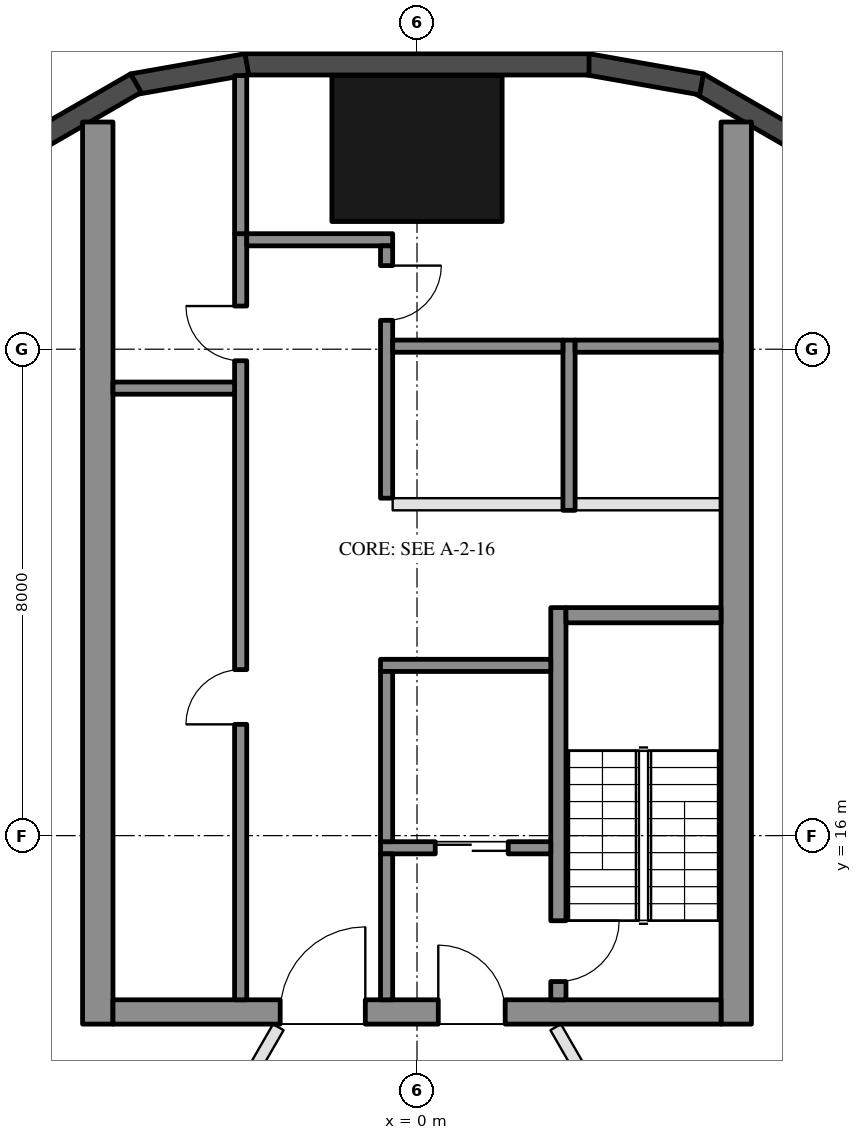
"""IFC4 building model, lengths in metres.
Left out: names, types, materials, properties, quantities, classifications, styles, units other than length and angle.
Written with IfcOpenShell. Run it as: python <this file> out.ifc"""

import sys

from ifc_helpers import new_model, si_unit, direction, frame, frame_2d, origin, origin_2d, place, context, subcontext, project, spatial, rectangle, hollow_rectangle, extrude, element, fill, save


model = new_model("IFC4")
c1 = context("Model", 3, precision=1e-05, world=origin(), true_north=direction((0.0, 1.0)))
c2 = subcontext(c1, "Body", "Model", "MODEL_VIEW")
j1 = project(units=[si_unit("LENGTHUNIT", "METRE"), si_unit("PLANEANGLEUNIT", "RADIAN")], contexts=[c1])
p1 = place(None, origin())
s1 = spatial("IfcSite", under=j1, at=p1, CompositionType="ELEMENT")
p2 = place(p1, origin())
s2 = spatial("IfcBuilding", under=s1, at=p2, CompositionType="ELEMENT")
p3 = place(p2, frame((0.0, 0.0, 79.8)))
s3 = spatial("IfcBuildingStorey", under=s2, at=p3, CompositionType="ELEMENT", Elevation=79.8)
p4 = place(p3, frame((0.0, 27.3, 0.0), z_axis=(0.0, 0.0, 1.0), x_axis=(1.0, 0.0, 0.0)))
e1 = element("IfcColumn", 1, at=p4, inside=s3, PredefinedType="COLUMN", context=c2, shape_type="SweptSolid", body=[
    extrude(hollow_rectangle(XDim=2.8, YDim=2.4, WallThickness=0.07, at=origin_2d()), origin(), (0.0, 0.0, 1.0), 3.7),
])
for number, where, z_axis, x_axis in (
    (2, (6.277, 27.422, 0.0), (0.0, 0.0, 1.0), (-0.866, 0.5, 0.0)),
    (3, (4.68, 28.356, 0.0), (0.0, 0.0, 1.0), (-0.985, 0.174, 0.0)),
):
    element("IfcWall", number, at=place(p3, frame(where, z_axis=z_axis, x_axis=x_axis)), inside=s3, PredefinedType="SOLIDWALL", context=c2, shape_type="SweptSolid", body=[
        extrude(rectangle(XDim=1.91, YDim=0.35, at=frame_2d((0.955, 0.0))), origin(), (0.0, 0.0, 1.0), 3.55),
    ])
p5 = place(p3, frame((2.829, 28.685, 0.0), z_axis=(0.0, 0.0, 1.0), x_axis=(-1.0, 0.0, 0.0)))
e4 = element("IfcWall", 4, at=p5, inside=s3, PredefinedType="SOLIDWALL", context=c2, shape_type="SweptSolid", body=[
    extrude(rectangle(XDim=5.658, YDim=0.35, at=frame_2d((2.829, 0.0))), origin(), (0.0, 0.0, 1.0), 3.55),
])
for number, where, z_axis, x_axis in (
    (5, (-2.799, 28.688, 0.0), (0.0, 0.0, 1.0), (-0.985, -0.174, 0.0)),
    (6, (-4.623, 28.377, 0.0), (0.0, 0.0, 1.0), (-0.866, -0.5, 0.0)),
):
    element("IfcWall", number, at=place(p3, frame(where, z_axis=z_axis, x_axis=x_axis)), inside=s3, PredefinedType="SOLIDWALL", context=c2, shape_type="SweptSolid", body=[
        extrude(rectangle(XDim=1.91, YDim=0.35, at=frame_2d((0.955, 0.0))), origin(), (0.0, 0.0, 1.0), 3.55),
    ])
for number, where, z_axis, x_axis in (
    (7, (5.25, 12.9, 0.0), (0.0, 0.0, 1.0), (0.0, 1.0, 0.0)),
    (8, (-5.25, 12.9, 0.0), (0.0, 0.0, 1.0), (0.0, 1.0, 0.0)),
):
    element("IfcWall", number, at=place(p3, frame(where, z_axis=z_axis, x_axis=x_axis)), inside=s3, PredefinedType="SHEAR", context=c2, shape_type="SweptSolid", body=[
        extrude(rectangle(XDim=14.837, YDim=0.5, at=frame_2d((7.418, 0.0))), origin(), (0.0, 0.0, 1.0), 3.5),
    ])
p6 = place(p3, frame((5.0, 13.1, 0.0), z_axis=(0.0, 0.0, 1.0), x_axis=(-1.0, 0.0, 0.0)))
e9 = element("IfcWall", 9, at=p6, inside=s3, PredefinedType="SHEAR", context=c2, shape_type="SweptSolid", body=[
    extrude(rectangle(XDim=10.0, YDim=0.4, at=frame_2d((5.0, 0.0))), origin(), (0.0, 0.0, 1.0), 3.5),
])
p7 = place(p6, frame((3.55, 0.0, 0.0)))
e10 = element("IfcOpeningElement", 10, at=p7, cuts=e9, PredefinedType="OPENING", context=c2, shape_type="SweptSolid", body=[
    extrude(rectangle(XDim=1.1, YDim=2.1, at=frame_2d((0.55, 1.05))), frame((0.0, 0.21, 0.0), z_axis=(0.0, -1.0, 0.0), x_axis=(1.0, 0.0, 0.0)), (0.0, 0.0, 1.0), 0.42),
])
p8 = place(p6, frame((5.85, 0.0, 0.0)))
e11 = element("IfcOpeningElement", 11, at=p8, cuts=e9, PredefinedType="OPENING", context=c2, shape_type="SweptSolid", body=[
    extrude(rectangle(XDim=1.4, YDim=2.1, at=frame_2d((0.7, 1.05))), frame((0.0, 0.21, 0.0), z_axis=(0.0, -1.0, 0.0), x_axis=(1.0, 0.0, 0.0)), (0.0, 0.0, 1.0), 0.42),
])
p9 = place(p3, frame((2.325, 13.3, 0.0), z_axis=(0.0, 0.0, 1.0), x_axis=(0.0, 1.0, 0.0)))
e12 = element("IfcWall", 12, at=p9, inside=s3, PredefinedType="SHEAR", context=c2, shape_type="SweptSolid", body=[
    extrude(rectangle(XDim=6.45, YDim=0.25, at=frame_2d((3.225, 0.0))), origin(), (0.0, 0.0, 1.0), 3.5),
])
p10 = place(p9, frame((0.3, 0.0, 0.0)))
e13 = element("IfcOpeningElement", 13, at=p10, cuts=e12, PredefinedType="OPENING", context=c2, shape_type="SweptSolid", body=[
    extrude(rectangle(XDim=1.0, YDim=2.1, at=frame_2d((0.5, 1.05))), frame((0.0, 0.135, 0.0), z_axis=(0.0, -1.0, 0.0), x_axis=(1.0, 0.0, 0.0)), (0.0, 0.0, 1.0), 0.27),
])
p11 = place(p3, frame((5.0, 19.625, 0.0), z_axis=(0.0, 0.0, 1.0), x_axis=(-1.0, 0.0, 0.0)))
e14 = element("IfcWall", 14, at=p11, inside=s3, PredefinedType="SHEAR", context=c2, shape_type="SweptSolid", body=[
    extrude(rectangle(XDim=2.55, YDim=0.25, at=frame_2d((1.275, 0.0))), origin(), (0.0, 0.0, 1.0), 3.5),
])
p12 = place(p3, frame((2.2, 18.8, 0.0), z_axis=(0.0, 0.0, 1.0), x_axis=(-1.0, 0.0, 0.0)))
e15 = element("IfcWall", 15, at=p12, inside=s3, PredefinedType="SHEAR", context=c2, shape_type="SweptSolid", body=[
    extrude(rectangle(XDim=2.8, YDim=0.2, at=frame_2d((1.4, 0.0))), origin(), (0.0, 0.0, 1.0), 3.5),
])
p13 = place(p3, frame((2.2, 15.8, 0.0), z_axis=(0.0, 0.0, 1.0), x_axis=(-1.0, 0.0, 0.0)))
e16 = element("IfcWall", 16, at=p13, inside=s3, PredefinedType="SHEAR", context=c2, shape_type="SweptSolid", body=[
    extrude(rectangle(XDim=2.8, YDim=0.2, at=frame_2d((1.4, 0.0))), origin(), (0.0, 0.0, 1.0), 3.5),
])
p14 = place(p13, frame((0.7, 0.0, 0.0)))
e17 = element("IfcOpeningElement", 17, at=p14, cuts=e16, PredefinedType="OPENING", context=c2, shape_type="SweptSolid", body=[
    extrude(rectangle(XDim=1.2, YDim=2.1, at=frame_2d((0.6, 1.05))), frame((0.0, 0.11, 0.0), z_axis=(0.0, -1.0, 0.0), x_axis=(1.0, 0.0, 0.0)), (0.0, 0.0, 1.0), 0.22),
])
p15 = place(p3, frame((-0.5, 15.9, 0.0), z_axis=(0.0, 0.0, 1.0), x_axis=(0.0, 1.0, 0.0)))
e18 = element("IfcWall", 18, at=p15, inside=s3, PredefinedType="SHEAR", context=c2, shape_type="SweptSolid", body=[
    extrude(rectangle(XDim=2.8, YDim=0.2, at=frame_2d((1.4, 0.0))), origin(), (0.0, 0.0, 1.0), 3.5),
])
p16 = place(p3, frame((-0.5, 13.3, 0.0), z_axis=(0.0, 0.0, 1.0), x_axis=(0.0, 1.0, 0.0)))
e19 = element("IfcWall", 19, at=p16, inside=s3, PredefinedType="SHEAR", context=c2, shape_type="SweptSolid", body=[
    extrude(rectangle(XDim=2.4, YDim=0.2, at=frame_2d((1.2, 0.0))), origin(), (0.0, 0.0, 1.0), 3.5),
])
p17 = place(p3, frame((-2.9, 13.3, 0.0), z_axis=(0.0, 0.0, 1.0), x_axis=(0.0, 1.0, 0.0)))
e20 = element("IfcWall", 20, at=p17, inside=s3, PredefinedType="SHEAR", context=c2, shape_type="SweptSolid", body=[
    extrude(rectangle(XDim=12.6, YDim=0.2, at=frame_2d((6.3, 0.0))), origin(), (0.0, 0.0, 1.0), 3.5),
])
p18 = place(p17, frame((4.53, 0.0, 0.0)))
e21 = element("IfcOpeningElement", 21, at=p18, cuts=e20, PredefinedType="OPENING", context=c2, shape_type="SweptSolid", body=[
    extrude(rectangle(XDim=0.9, YDim=2.1, at=frame_2d((0.45, 1.05))), frame((0.0, 0.11, 0.0), z_axis=(0.0, -1.0, 0.0), x_axis=(1.0, 0.0, 0.0)), (0.0, 0.0, 1.0), 0.22),
])
p19 = place(p17, frame((10.51, 0.0, 0.0)))
e22 = element("IfcOpeningElement", 22, at=p19, cuts=e20, PredefinedType="OPENING", context=c2, shape_type="SweptSolid", body=[
    extrude(rectangle(XDim=0.9, YDim=2.1, at=frame_2d((0.45, 1.05))), frame((0.0, 0.11, 0.0), z_axis=(0.0, -1.0, 0.0), x_axis=(1.0, 0.0, 0.0)), (0.0, 0.0, 1.0), 0.22),
])
p20 = place(p3, frame((-0.4, 25.8, 0.0), z_axis=(0.0, 0.0, 1.0), x_axis=(-1.0, 0.0, 0.0)))
e23 = element("IfcWall", 23, at=p20, inside=s3, PredefinedType="SHEAR", context=c2, shape_type="SweptSolid", body=[
    extrude(rectangle(XDim=2.4, YDim=0.2, at=frame_2d((1.2, 0.0))), origin(), (0.0, 0.0, 1.0), 3.5),
])
p21 = place(p3, frame((-0.5, 21.55, 0.0), z_axis=(0.0, 0.0, 1.0), x_axis=(0.0, 1.0, 0.0)))
e24 = element("IfcWall", 24, at=p21, inside=s3, PredefinedType="SHEAR", context=c2, shape_type="SweptSolid", body=[
    extrude(rectangle(XDim=4.15, YDim=0.2, at=frame_2d((2.075, 0.0))), origin(), (0.0, 0.0, 1.0), 3.5),
])
p22 = place(p21, frame((2.925, 0.0, 0.0)))
e25 = element("IfcOpeningElement", 25, at=p22, cuts=e24, PredefinedType="OPENING", context=c2, shape_type="SweptSolid", body=[
    extrude(rectangle(XDim=0.9, YDim=2.1, at=frame_2d((0.45, 1.05))), frame((0.0, 0.11, 0.0), z_axis=(0.0, -1.0, 0.0), x_axis=(1.0, 0.0, 0.0)), (0.0, 0.0, 1.0), 0.22),
])
p23 = place(p3, frame((-3.0, 23.36, 0.0), z_axis=(0.0, 0.0, 1.0), x_axis=(-1.0, 0.0, 0.0)))
e26 = element("IfcWall", 26, at=p23, inside=s3, PredefinedType="SHEAR", context=c2, shape_type="SweptSolid", body=[
    extrude(rectangle(XDim=2.0, YDim=0.2, at=frame_2d((1.0, 0.0))), origin(), (0.0, 0.0, 1.0), 3.5),
])
p24 = place(p3, frame((-2.9, 25.9, 0.0), z_axis=(0.0, 0.0, 1.0), x_axis=(0.0, 1.0, 0.0)))
e27 = element("IfcWall", 27, at=p24, inside=s3, PredefinedType="SHEAR", context=c2, shape_type="SweptSolid", body=[
    extrude(rectangle(XDim=2.6, YDim=0.2, at=frame_2d((1.3, 0.0))), origin(), (0.0, 0.0, 1.0), 3.5),
])
p25 = place(p3, frame((2.5, 21.35, 0.0), z_axis=(0.0, 0.0, 1.0), x_axis=(0.0, 1.0, 0.0)))
e28 = element("IfcWall", 28, at=p25, inside=s3, PredefinedType="SHEAR", context=c2, shape_type="SweptSolid", body=[
    extrude(rectangle(XDim=2.8, YDim=0.2, at=frame_2d((1.4, 0.0))), origin(), (0.0, 0.0, 1.0), 3.5),
])
p26 = place(p3, frame((5.0, 24.05, 0.0), z_axis=(0.0, 0.0, 1.0), x_axis=(-1.0, 0.0, 0.0)))
e29 = element("IfcWall", 29, at=p26, inside=s3, PredefinedType="SHEAR", context=c2, shape_type="SweptSolid", body=[
    extrude(rectangle(XDim=2.4, YDim=0.2, at=frame_2d((1.2, 0.0))), origin(), (0.0, 0.0, 1.0), 3.5),
])
p27 = place(p3, frame((2.4, 24.05, 0.0), z_axis=(0.0, 0.0, 1.0), x_axis=(-1.0, 0.0, 0.0)))
e30 = element("IfcWall", 30, at=p27, inside=s3, PredefinedType="SHEAR", context=c2, shape_type="SweptSolid", body=[
    extrude(rectangle(XDim=2.8, YDim=0.2, at=frame_2d((1.4, 0.0))), origin(), (0.0, 0.0, 1.0), 3.5),
])
p28 = place(p3, frame((5.0, 21.45, 0.0), z_axis=(0.0, 0.0, 1.0), x_axis=(-1.0, 0.0, 0.0)))
e31 = element("IfcWall", 31, at=p28, inside=s3, PredefinedType="PARTITIONING", context=c2, shape_type="SweptSolid", body=[
    extrude(rectangle(XDim=2.4, YDim=0.2, at=frame_2d((1.2, 0.0))), origin(), (0.0, 0.0, 1.0), 3.5),
])
p29 = place(p3, frame((2.4, 21.45, 0.0), z_axis=(0.0, 0.0, 1.0), x_axis=(-1.0, 0.0, 0.0)))
e32 = element("IfcWall", 32, at=p29, inside=s3, PredefinedType="PARTITIONING", context=c2, shape_type="SweptSolid", body=[
    extrude(rectangle(XDim=2.8, YDim=0.2, at=frame_2d((1.4, 0.0))), origin(), (0.0, 0.0, 1.0), 3.5),
])
p30 = place(p3, frame((2.281, 12.85, 0.0), z_axis=(0.0, 0.0, 1.0), x_axis=(0.500015893381, -0.866016227542, 0.0)))
e33 = element("IfcWall", 33, at=p30, inside=s3, PredefinedType="PARTITIONING", context=c2, shape_type="SweptSolid", body=[
    extrude(rectangle(XDim=6.482, YDim=0.2, at=frame_2d((3.241, 0.0))), origin(), (0.0, 0.0, 1.0), 2.95),
])
p31 = place(p30, frame((2.741, 0.0, 0.0)))
e34 = element("IfcOpeningElement", 34, at=p31, cuts=e33, PredefinedType="OPENING", context=c2, shape_type="SweptSolid", body=[
    extrude(rectangle(XDim=1.0, YDim=2.1, at=frame_2d((0.5, 1.05))), frame((0.0, 0.11, 0.0), z_axis=(0.0, -1.0, 0.0), x_axis=(1.0, 0.0, 0.0)), (0.0, 0.0, 1.0), 0.22),
])
p32 = place(p3, frame((-6.669, 5.249, 0.0), z_axis=(0.0, 0.0, 1.0), x_axis=(0.499992114976, 0.866029956157, 0.0)))
e35 = element("IfcWall", 35, at=p32, inside=s3, PredefinedType="PARTITIONING", context=c2, shape_type="SweptSolid", body=[
    extrude(rectangle(XDim=8.778, YDim=0.2, at=frame_2d((4.389, 0.0))), origin(), (0.0, 0.0, 1.0), 2.95),
])
p33 = place(p32, frame((3.889, 0.0, 0.0)))
e36 = element("IfcOpeningElement", 36, at=p33, cuts=e35, PredefinedType="OPENING", context=c2, shape_type="SweptSolid", body=[
    extrude(rectangle(XDim=1.0, YDim=2.1, at=frame_2d((0.5, 1.05))), frame((0.0, 0.11, 0.0), z_axis=(0.0, -1.0, 0.0), x_axis=(1.0, 0.0, 0.0)), (0.0, 0.0, 1.0), 0.22),
])
p34 = place(p14, origin())
e37 = element("IfcDoor", 37, at=p34, inside=s3, OperationType="DOUBLE_DOOR_SLIDING", PredefinedType="DOOR", context=c2, shape_type="SweptSolid", body=[
    extrude(rectangle(XDim=1.2, YDim=2.1, at=frame_2d((0.6, 1.05))), frame((0.0, 0.025, 0.0), z_axis=(0.0, -1.0, 0.0), x_axis=(1.0, 0.0, 0.0)), (0.0, 0.0, 1.0), 0.05),
])
fill(e17, e37)
p35 = place(p18, origin())
e38 = element("IfcDoor", 38, at=p35, inside=s3, OperationType="SINGLE_SWING_LEFT", PredefinedType="DOOR", context=c2, shape_type="SweptSolid", body=[
    extrude(rectangle(XDim=0.9, YDim=2.1, at=frame_2d((0.45, 1.05))), frame((0.0, 0.025, 0.0), z_axis=(0.0, -1.0, 0.0), x_axis=(1.0, 0.0, 0.0)), (0.0, 0.0, 1.0), 0.05),
])
fill(e21, e38)
p36 = place(p19, origin())
e39 = element("IfcDoor", 39, at=p36, inside=s3, OperationType="SINGLE_SWING_RIGHT", PredefinedType="DOOR", context=c2, shape_type="SweptSolid", body=[
    extrude(rectangle(XDim=0.9, YDim=2.1, at=frame_2d((0.45, 1.05))), frame((0.0, 0.025, 0.0), z_axis=(0.0, -1.0, 0.0), x_axis=(1.0, 0.0, 0.0)), (0.0, 0.0, 1.0), 0.05),
])
fill(e22, e39)
p37 = place(p22, frame((0.9, 0.0, 0.0), z_axis=(0.0, 0.0, 1.0), x_axis=(-1.0, 0.0, 0.0)))
e40 = element("IfcDoor", 40, at=p37, inside=s3, OperationType="SINGLE_SWING_LEFT", PredefinedType="DOOR", context=c2, shape_type="SweptSolid", body=[
    extrude(rectangle(XDim=0.9, YDim=2.1, at=frame_2d((0.45, 1.05))), frame((0.0, 0.025, 0.0), z_axis=(0.0, -1.0, 0.0), x_axis=(1.0, 0.0, 0.0)), (0.0, 0.0, 1.0), 0.05),
])
fill(e25, e40)
p38 = place(p7, frame((1.1, 0.0, 0.0), z_axis=(0.0, 0.0, 1.0), x_axis=(-1.0, 0.0, 0.0)))
e41 = element("IfcDoor", 41, at=p38, inside=s3, OperationType="SINGLE_SWING_LEFT", PredefinedType="DOOR", context=c2, shape_type="SweptSolid", body=[
    extrude(rectangle(XDim=1.1, YDim=2.1, at=frame_2d((0.55, 1.05))), frame((0.0, 0.025, 0.0), z_axis=(0.0, -1.0, 0.0), x_axis=(1.0, 0.0, 0.0)), (0.0, 0.0, 1.0), 0.05),
])
fill(e10, e41)
p39 = place(p8, frame((1.4, 0.0, 0.0), z_axis=(0.0, 0.0, 1.0), x_axis=(-1.0, 0.0, 0.0)))
e42 = element("IfcDoor", 42, at=p39, inside=s3, OperationType="DOUBLE_DOOR_SINGLE_SWING", PredefinedType="DOOR", context=c2, shape_type="SweptSolid", body=[
    extrude(rectangle(XDim=1.4, YDim=2.1, at=frame_2d((0.7, 1.05))), frame((0.0, 0.025, 0.0), z_axis=(0.0, -1.0, 0.0), x_axis=(1.0, 0.0, 0.0)), (0.0, 0.0, 1.0), 0.05),
])
fill(e11, e42)
p40 = place(p10, frame((1.0, 0.0, 0.0), z_axis=(0.0, 0.0, 1.0), x_axis=(-1.0, 0.0, 0.0)))
e43 = element("IfcDoor", 43, at=p40, inside=s3, OperationType="SINGLE_SWING_LEFT", PredefinedType="DOOR", context=c2, shape_type="SweptSolid", body=[
    extrude(rectangle(XDim=1.0, YDim=2.1, at=frame_2d((0.5, 1.05))), frame((0.0, 0.025, 0.0), z_axis=(0.0, -1.0, 0.0), x_axis=(1.0, 0.0, 0.0)), (0.0, 0.0, 1.0), 0.05),
])
fill(e13, e43)
save(model, sys.argv[1])
